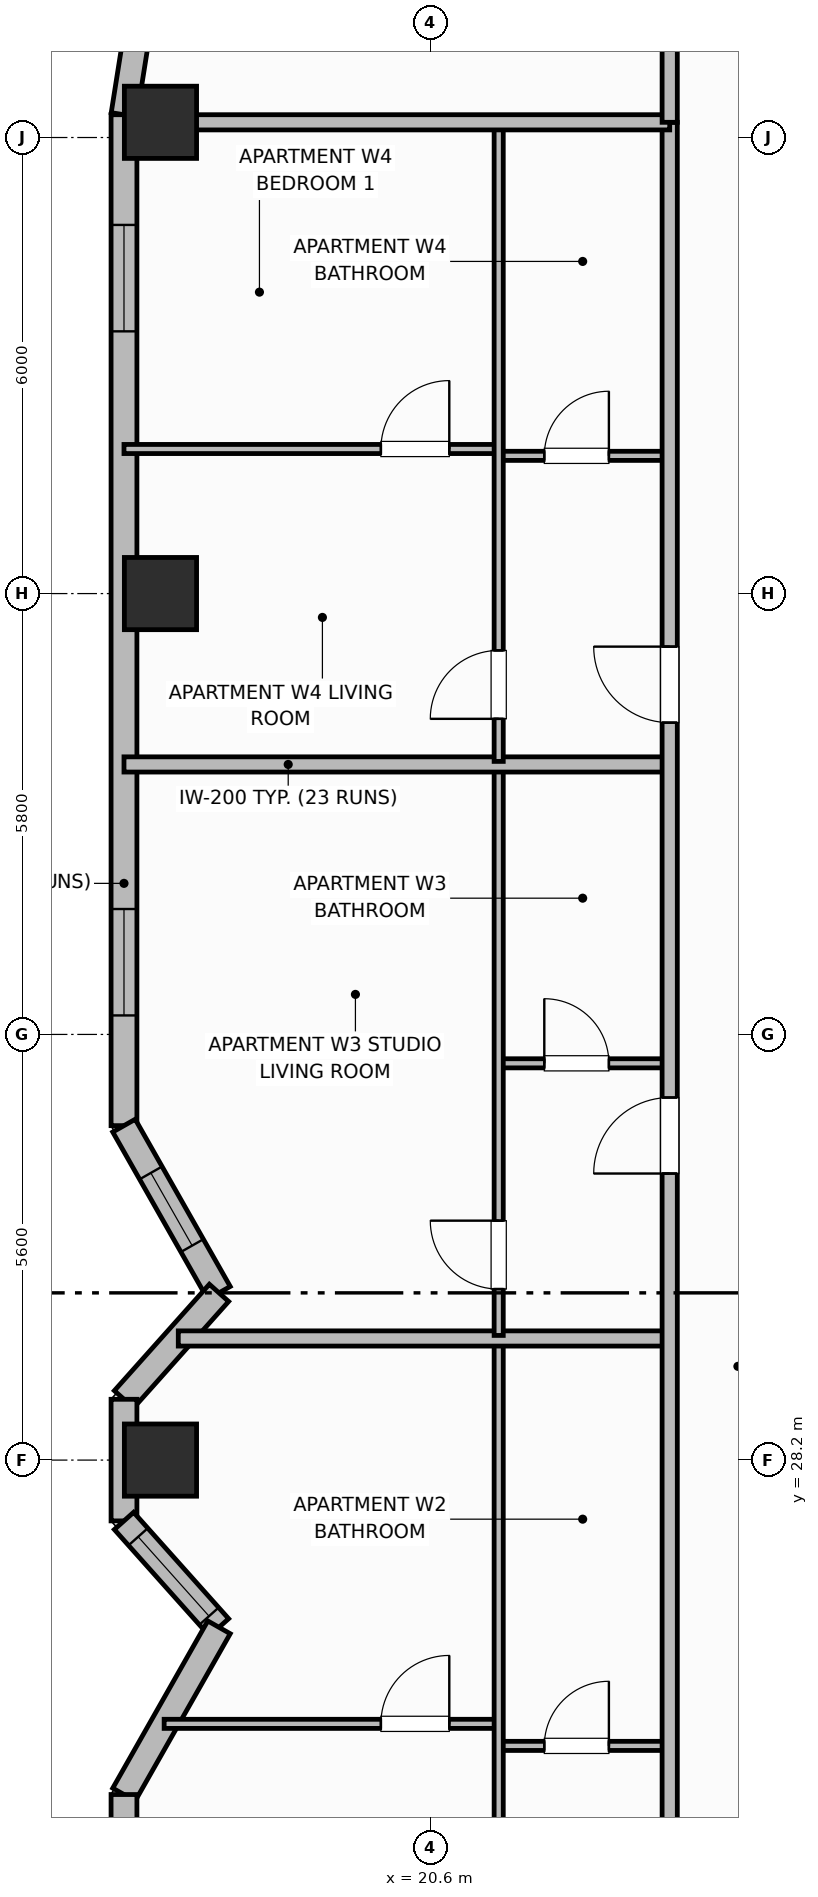
"""IFC4 building model, lengths in metres.
Left out: names, types, materials, properties, quantities, classifications, styles, units other than length and angle.
Written with IfcOpenShell. Run it as: python <this file> out.ifc"""

import sys

from ifc_helpers import new_model, si_unit, direction, frame, frame_2d, origin, origin_2d, place, context, subcontext, project, spatial, rectangle, extrude, element, fill, save


model = new_model("IFC4")
c1 = context("Model", 3, precision=1e-05, world=origin(), true_north=direction((0.0, 1.0)))
c2 = subcontext(c1, "Body", "Model", "MODEL_VIEW")
j1 = project(units=[si_unit("LENGTHUNIT", "METRE"), si_unit("PLANEANGLEUNIT", "RADIAN")], contexts=[c1])
p1 = place(None, origin())
s1 = spatial("IfcSite", under=j1, at=p1, CompositionType="ELEMENT")
p2 = place(p1, origin())
s2 = spatial("IfcBuilding", under=s1, at=p2, CompositionType="ELEMENT")
p3 = place(p2, frame((0.0, 0.0, 173.7)))
s3 = spatial("IfcBuildingStorey", under=s2, at=p3, CompositionType="ELEMENT", Elevation=173.7)
for number, where, z_axis, x_axis in (
    (1, (17.05, 28.2, 0.0), (0.0, 0.0, 1.0), (1.0, 0.0, 0.0)),
    (2, (17.05, 39.6, 0.0), (0.0, 0.0, 1.0), (1.0, 0.0, 0.0)),
    (3, (17.05, 45.8, 0.0), (0.0, 0.0, 1.0), (1.0, 0.0, 0.0)),
):
    element("IfcColumn", number, at=place(p3, frame(where, z_axis=z_axis, x_axis=x_axis)), inside=s3, PredefinedType="COLUMN", context=c2, shape_type="SweptSolid", body=[
        extrude(rectangle(XDim=0.95, YDim=0.95, at=origin_2d()), origin(), (0.0, 0.0, 1.0), 3.7),
    ])
p4 = place(p3, frame((16.748, 47.022, 0.0), z_axis=(0.0, 0.0, 1.0), x_axis=(-0.156481329164, -0.987680916907, 0.0)))
e4 = element("IfcWall", 4, at=p4, inside=s3, PredefinedType="SOLIDWALL", context=c2, shape_type="SweptSolid", body=[
    extrude(rectangle(XDim=1.136, YDim=0.34, at=frame_2d((0.568, 0.0))), origin(), (0.0, 0.0, 1.0), 2.72),
])
p5 = place(p3, frame((16.57, 45.9, 0.0), z_axis=(0.0, 0.0, 1.0), x_axis=(0.0, -1.0, 0.0)))
e5 = element("IfcWall", 5, at=p5, inside=s3, PredefinedType="SOLIDWALL", context=c2, shape_type="SweptSolid", body=[
    extrude(rectangle(XDim=13.3, YDim=0.34, at=frame_2d((6.65, 0.0))), origin(), (0.0, 0.0, 1.0), 2.72),
])
p6 = place(p5, frame((1.45, 0.0, 0.75)))
e6 = element("IfcOpeningElement", 6, at=p6, cuts=e5, PredefinedType="OPENING", context=c2, shape_type="SweptSolid", body=[
    extrude(rectangle(XDim=1.4, YDim=1.85, at=frame_2d((0.7, 0.925))), frame((0.0, 0.18, 0.0), z_axis=(0.0, -1.0, 0.0), x_axis=(1.0, 0.0, 0.0)), (0.0, 0.0, 1.0), 0.36),
])
p7 = place(p5, frame((10.45, 0.0, 0.75)))
e7 = element("IfcOpeningElement", 7, at=p7, cuts=e5, PredefinedType="OPENING", context=c2, shape_type="SweptSolid", body=[
    extrude(rectangle(XDim=1.4, YDim=1.85, at=frame_2d((0.7, 0.925))), frame((0.0, 0.18, 0.0), z_axis=(0.0, -1.0, 0.0), x_axis=(1.0, 0.0, 0.0)), (0.0, 0.0, 1.0), 0.36),
])
p8 = place(p3, frame((16.57, 32.6, 0.0), z_axis=(0.0, 0.0, 1.0), x_axis=(0.493976255291, -0.869475393101, 0.0)))
e8 = element("IfcWall", 8, at=p8, inside=s3, PredefinedType="SOLIDWALL", context=c2, shape_type="SweptSolid", body=[
    extrude(rectangle(XDim=2.531, YDim=0.34, at=frame_2d((1.265, 0.0))), origin(), (0.0, 0.0, 1.0), 2.72),
])
p9 = place(p8, frame((0.715, 0.0, 0.91)))
e9 = element("IfcOpeningElement", 9, at=p9, cuts=e8, PredefinedType="OPENING", context=c2, shape_type="SweptSolid", body=[
    extrude(rectangle(XDim=1.1, YDim=1.65, at=frame_2d((0.55, 0.825))), frame((0.0, 0.18, 0.0), z_axis=(0.0, -1.0, 0.0), x_axis=(1.0, 0.0, 0.0)), (0.0, 0.0, 1.0), 0.36),
])
p10 = place(p3, frame((17.82, 30.4, 0.0), z_axis=(0.0, 0.0, 1.0), x_axis=(-0.666041619974, -0.74591457987, 0.0)))
e10 = element("IfcWall", 10, at=p10, inside=s3, PredefinedType="SOLIDWALL", context=c2, shape_type="SweptSolid", body=[
    extrude(rectangle(XDim=1.877, YDim=0.34, at=frame_2d((0.938, 0.0))), origin(), (0.0, 0.0, 1.0), 2.72),
])
p11 = place(p3, frame((16.57, 29.0, 0.0), z_axis=(0.0, 0.0, 1.0), x_axis=(0.0, -1.0, 0.0)))
e11 = element("IfcWall", 11, at=p11, inside=s3, PredefinedType="SOLIDWALL", context=c2, shape_type="SweptSolid", body=[
    extrude(rectangle(XDim=1.6, YDim=0.34, at=frame_2d((0.8, 0.0))), origin(), (0.0, 0.0, 1.0), 2.72),
])
p12 = place(p3, frame((16.57, 27.4, 0.0), z_axis=(0.0, 0.0, 1.0), x_axis=(0.666041619974, -0.74591457987, 0.0)))
e12 = element("IfcWall", 12, at=p12, inside=s3, PredefinedType="SOLIDWALL", context=c2, shape_type="SweptSolid", body=[
    extrude(rectangle(XDim=1.877, YDim=0.34, at=frame_2d((0.938, 0.0))), origin(), (0.0, 0.0, 1.0), 2.72),
])
p13 = place(p12, frame((0.28, 0.0, 0.71)))
e13 = element("IfcOpeningElement", 13, at=p13, cuts=e12, PredefinedType="OPENING", context=c2, shape_type="SweptSolid", body=[
    extrude(rectangle(XDim=1.4, YDim=1.85, at=frame_2d((0.7, 0.925))), frame((0.0, 0.18, 0.0), z_axis=(0.0, -1.0, 0.0), x_axis=(1.0, 0.0, 0.0)), (0.0, 0.0, 1.0), 0.36),
])
p14 = place(p3, frame((17.82, 26.0, 0.0), z_axis=(0.0, 0.0, 1.0), x_axis=(-0.494017696272, -0.869451847873, 0.0)))
e14 = element("IfcWall", 14, at=p14, inside=s3, PredefinedType="SOLIDWALL", context=c2, shape_type="SweptSolid", body=[
    extrude(rectangle(XDim=2.53, YDim=0.34, at=frame_2d((1.265, 0.0))), origin(), (0.0, 0.0, 1.0), 2.72),
])
p15 = place(p3, frame((16.57, 23.8, 0.0), z_axis=(0.0, 0.0, 1.0), x_axis=(0.0, -1.0, 0.0)))
e15 = element("IfcWall", 15, at=p15, inside=s3, PredefinedType="SOLIDWALL", context=c2, shape_type="SweptSolid", body=[
    extrude(rectangle(XDim=13.3, YDim=0.34, at=frame_2d((6.65, 0.0))), origin(), (0.0, 0.0, 1.0), 2.72),
])
p16 = place(p15, frame((2.1, 0.0, 0.0)))
e16 = element("IfcOpeningElement", 16, at=p16, cuts=e15, PredefinedType="OPENING", context=c2, shape_type="SweptSolid", body=[
    extrude(rectangle(XDim=1.6, YDim=2.1, at=frame_2d((0.8, 1.05))), frame((0.0, 0.18, 0.0), z_axis=(0.0, -1.0, 0.0), x_axis=(1.0, 0.0, 0.0)), (0.0, 0.0, 1.0), 0.36),
])
p17 = place(p15, frame((5.04, 0.0, 0.71)))
e17 = element("IfcOpeningElement", 17, at=p17, cuts=e15, PredefinedType="OPENING", context=c2, shape_type="SweptSolid", body=[
    extrude(rectangle(XDim=1.4, YDim=1.85, at=frame_2d((0.7, 0.925))), frame((0.0, 0.18, 0.0), z_axis=(0.0, -1.0, 0.0), x_axis=(1.0, 0.0, 0.0)), (0.0, 0.0, 1.0), 0.36),
])
p18 = place(p15, frame((10.6, 0.0, 0.95)))
e18 = element("IfcOpeningElement", 18, at=p18, cuts=e15, PredefinedType="OPENING", context=c2, shape_type="SweptSolid", body=[
    extrude(rectangle(XDim=1.1, YDim=1.65, at=frame_2d((0.55, 0.825))), frame((0.0, 0.18, 0.0), z_axis=(0.0, -1.0, 0.0), x_axis=(1.0, 0.0, 0.0)), (0.0, 0.0, 1.0), 0.36),
])
p19 = place(p3, frame((21.5, 24.44, 0.0), z_axis=(0.0, 0.0, 1.0), x_axis=(1.0, 0.0, 0.0)))
e19 = element("IfcWall", 19, at=p19, inside=s3, PredefinedType="PARTITIONING", context=c2, shape_type="SweptSolid", body=[
    extrude(rectangle(XDim=2.25, YDim=0.12, at=frame_2d((1.125, 0.0))), origin(), (0.0, 0.0, 1.0), 2.55),
])
p20 = place(p19, frame((0.6, 0.0, 0.0)))
e20 = element("IfcOpeningElement", 20, at=p20, cuts=e19, PredefinedType="OPENING", context=c2, shape_type="SweptSolid", body=[
    extrude(rectangle(XDim=0.85, YDim=2.1, at=frame_2d((0.425, 1.05))), frame((0.0, 0.07, 0.0), z_axis=(0.0, -1.0, 0.0), x_axis=(1.0, 0.0, 0.0)), (0.0, 0.0, 1.0), 0.14),
])
p21 = place(p3, frame((17.098, 24.73, 0.0), z_axis=(0.0, 0.0, 1.0), x_axis=(1.0, 0.0, 0.0)))
e21 = element("IfcWall", 21, at=p21, inside=s3, PredefinedType="PARTITIONING", context=c2, shape_type="SweptSolid", body=[
    extrude(rectangle(XDim=4.402, YDim=0.12, at=frame_2d((2.201, 0.0))), origin(), (0.0, 0.0, 1.0), 2.55),
])
p22 = place(p21, frame((2.852, 0.0, 0.0)))
e22 = element("IfcOpeningElement", 22, at=p22, cuts=e21, PredefinedType="OPENING", context=c2, shape_type="SweptSolid", body=[
    extrude(rectangle(XDim=0.9, YDim=2.1, at=frame_2d((0.45, 1.05))), frame((0.0, 0.07, 0.0), z_axis=(0.0, -1.0, 0.0), x_axis=(1.0, 0.0, 0.0)), (0.0, 0.0, 1.0), 0.14),
])
p23 = place(p3, frame((21.5, 19.54, 0.0), z_axis=(0.0, 0.0, 1.0), x_axis=(0.0, 1.0, 0.0)))
e23 = element("IfcWall", 23, at=p23, inside=s3, PredefinedType="PARTITIONING", context=c2, shape_type="SweptSolid", body=[
    extrude(rectangle(XDim=10.22, YDim=0.12, at=frame_2d((5.11, 0.0))), origin(), (0.0, 0.0, 1.0), 2.55),
])
p24 = place(p23, frame((0.41, 0.0, 0.0)))
e24 = element("IfcOpeningElement", 24, at=p24, cuts=e23, PredefinedType="OPENING", context=c2, shape_type="SweptSolid", body=[
    extrude(rectangle(XDim=0.9, YDim=2.1, at=frame_2d((0.45, 1.05))), frame((0.0, 0.07, 0.0), z_axis=(0.0, -1.0, 0.0), x_axis=(1.0, 0.0, 0.0)), (0.0, 0.0, 1.0), 0.14),
])
p25 = place(p3, frame((17.284, 29.8, 0.0), z_axis=(0.0, 0.0, 1.0), x_axis=(1.0, 0.0, 0.0)))
e25 = element("IfcWall", 25, at=p25, inside=s3, PredefinedType="PARTITIONING", context=c2, shape_type="SweptSolid", body=[
    extrude(rectangle(XDim=6.466, YDim=0.2, at=frame_2d((3.233, 0.0))), origin(), (0.0, 0.0, 1.0), 2.55),
])
p26 = place(p3, frame((21.5, 33.42, 0.0), z_axis=(0.0, 0.0, 1.0), x_axis=(1.0, 0.0, 0.0)))
e26 = element("IfcWall", 26, at=p26, inside=s3, PredefinedType="PARTITIONING", context=c2, shape_type="SweptSolid", body=[
    extrude(rectangle(XDim=2.25, YDim=0.12, at=frame_2d((1.125, 0.0))), origin(), (0.0, 0.0, 1.0), 2.55),
])
p27 = place(p26, frame((0.6, 0.0, 0.0)))
e27 = element("IfcOpeningElement", 27, at=p27, cuts=e26, PredefinedType="OPENING", context=c2, shape_type="SweptSolid", body=[
    extrude(rectangle(XDim=0.85, YDim=2.1, at=frame_2d((0.425, 1.05))), frame((0.0, 0.07, 0.0), z_axis=(0.0, -1.0, 0.0), x_axis=(1.0, 0.0, 0.0)), (0.0, 0.0, 1.0), 0.14),
])
p28 = place(p3, frame((21.5, 29.84, 0.0), z_axis=(0.0, 0.0, 1.0), x_axis=(0.0, 1.0, 0.0)))
e28 = element("IfcWall", 28, at=p28, inside=s3, PredefinedType="PARTITIONING", context=c2, shape_type="SweptSolid", body=[
    extrude(rectangle(XDim=7.472, YDim=0.12, at=frame_2d((3.736, 0.0))), origin(), (0.0, 0.0, 1.0), 2.55),
])
p29 = place(p28, frame((0.61, 0.0, 0.0)))
e29 = element("IfcOpeningElement", 29, at=p29, cuts=e28, PredefinedType="OPENING", context=c2, shape_type="SweptSolid", body=[
    extrude(rectangle(XDim=0.9, YDim=2.1, at=frame_2d((0.45, 1.05))), frame((0.0, 0.07, 0.0), z_axis=(0.0, -1.0, 0.0), x_axis=(1.0, 0.0, 0.0)), (0.0, 0.0, 1.0), 0.14),
])
p30 = place(p3, frame((16.57, 37.352, 0.0), z_axis=(0.0, 0.0, 1.0), x_axis=(1.0, 0.0, 0.0)))
e30 = element("IfcWall", 30, at=p30, inside=s3, PredefinedType="PARTITIONING", context=c2, shape_type="SweptSolid", body=[
    extrude(rectangle(XDim=7.18, YDim=0.2, at=frame_2d((3.59, 0.0))), origin(), (0.0, 0.0, 1.0), 2.55),
])
p31 = place(p3, frame((21.5, 41.412, 0.0), z_axis=(0.0, 0.0, 1.0), x_axis=(1.0, 0.0, 0.0)))
e31 = element("IfcWall", 31, at=p31, inside=s3, PredefinedType="PARTITIONING", context=c2, shape_type="SweptSolid", body=[
    extrude(rectangle(XDim=2.25, YDim=0.12, at=frame_2d((1.125, 0.0))), origin(), (0.0, 0.0, 1.0), 2.55),
])
p32 = place(p31, frame((0.6, 0.0, 0.0)))
e32 = element("IfcOpeningElement", 32, at=p32, cuts=e31, PredefinedType="OPENING", context=c2, shape_type="SweptSolid", body=[
    extrude(rectangle(XDim=0.85, YDim=2.1, at=frame_2d((0.425, 1.05))), frame((0.0, 0.07, 0.0), z_axis=(0.0, -1.0, 0.0), x_axis=(1.0, 0.0, 0.0)), (0.0, 0.0, 1.0), 0.14),
])
p33 = place(p3, frame((16.57, 41.502, 0.0), z_axis=(0.0, 0.0, 1.0), x_axis=(1.0, 0.0, 0.0)))
e33 = element("IfcWall", 33, at=p33, inside=s3, PredefinedType="PARTITIONING", context=c2, shape_type="SweptSolid", body=[
    extrude(rectangle(XDim=4.93, YDim=0.12, at=frame_2d((2.465, 0.0))), origin(), (0.0, 0.0, 1.0), 2.55),
])
p34 = place(p33, frame((3.38, 0.0, 0.0)))
e34 = element("IfcOpeningElement", 34, at=p34, cuts=e33, PredefinedType="OPENING", context=c2, shape_type="SweptSolid", body=[
    extrude(rectangle(XDim=0.9, YDim=2.1, at=frame_2d((0.45, 1.05))), frame((0.0, 0.07, 0.0), z_axis=(0.0, -1.0, 0.0), x_axis=(1.0, 0.0, 0.0)), (0.0, 0.0, 1.0), 0.14),
])
p35 = place(p3, frame((21.5, 37.392, 0.0), z_axis=(0.0, 0.0, 1.0), x_axis=(0.0, 1.0, 0.0)))
e35 = element("IfcWall", 35, at=p35, inside=s3, PredefinedType="PARTITIONING", context=c2, shape_type="SweptSolid", body=[
    extrude(rectangle(XDim=8.368, YDim=0.12, at=frame_2d((4.184, 0.0))), origin(), (0.0, 0.0, 1.0), 2.55),
])
p36 = place(p35, frame((0.56, 0.0, 0.0)))
e36 = element("IfcOpeningElement", 36, at=p36, cuts=e35, PredefinedType="OPENING", context=c2, shape_type="SweptSolid", body=[
    extrude(rectangle(XDim=0.9, YDim=2.1, at=frame_2d((0.45, 1.05))), frame((0.0, 0.07, 0.0), z_axis=(0.0, -1.0, 0.0), x_axis=(1.0, 0.0, 0.0)), (0.0, 0.0, 1.0), 0.14),
])
p37 = place(p3, frame((23.75, 10.6, 0.0), z_axis=(0.0, 0.0, 1.0), x_axis=(0.0, 1.0, 0.0)))
e37 = element("IfcWall", 37, at=p37, inside=s3, PredefinedType="PARTITIONING", context=c2, shape_type="SweptSolid", body=[
    extrude(rectangle(XDim=35.2, YDim=0.2, at=frame_2d((17.6, 0.0))), origin(), (0.0, 0.0, 1.0), 2.55),
])
p38 = place(p37, frame((2.65, 0.0, 0.0)))
e38 = element("IfcOpeningElement", 38, at=p38, cuts=e37, PredefinedType="OPENING", context=c2, shape_type="SweptSolid", body=[
    extrude(rectangle(XDim=1.0, YDim=2.15, at=frame_2d((0.5, 1.075))), frame((0.0, 0.11, 0.0), z_axis=(0.0, -1.0, 0.0), x_axis=(1.0, 0.0, 0.0)), (0.0, 0.0, 1.0), 0.22),
])
p39 = place(p37, frame((11.4, 0.0, 0.0)))
e39 = element("IfcOpeningElement", 39, at=p39, cuts=e37, PredefinedType="OPENING", context=c2, shape_type="SweptSolid", body=[
    extrude(rectangle(XDim=1.0, YDim=2.15, at=frame_2d((0.5, 1.075))), frame((0.0, 0.11, 0.0), z_axis=(0.0, -1.0, 0.0), x_axis=(1.0, 0.0, 0.0)), (0.0, 0.0, 1.0), 0.22),
])
p40 = place(p37, frame((21.37, 0.0, 0.0)))
e40 = element("IfcOpeningElement", 40, at=p40, cuts=e37, PredefinedType="OPENING", context=c2, shape_type="SweptSolid", body=[
    extrude(rectangle(XDim=1.0, YDim=2.15, at=frame_2d((0.5, 1.075))), frame((0.0, 0.11, 0.0), z_axis=(0.0, -1.0, 0.0), x_axis=(1.0, 0.0, 0.0)), (0.0, 0.0, 1.0), 0.22),
])
p41 = place(p37, frame((27.302, 0.0, 0.0)))
e41 = element("IfcOpeningElement", 41, at=p41, cuts=e37, PredefinedType="OPENING", context=c2, shape_type="SweptSolid", body=[
    extrude(rectangle(XDim=1.0, YDim=2.15, at=frame_2d((0.5, 1.075))), frame((0.0, 0.11, 0.0), z_axis=(0.0, -1.0, 0.0), x_axis=(1.0, 0.0, 0.0)), (0.0, 0.0, 1.0), 0.22),
])
p42 = place(p3, frame((16.99, 45.8, 0.0), z_axis=(0.0, 0.0, 1.0), x_axis=(1.0, 0.0, 0.0)))
e42 = element("IfcWall", 42, at=p42, inside=s3, PredefinedType="PARTITIONING", context=c2, shape_type="SweptSolid", body=[
    extrude(rectangle(XDim=6.76, YDim=0.2, at=frame_2d((3.38, 0.0))), origin(), (0.0, 0.0, 1.0), 2.55),
])
p43 = place(p3, frame((23.75, 45.8, 0.0), z_axis=(0.0, 0.0, 1.0), x_axis=(0.0, 1.0, 0.0)))
e43 = element("IfcWall", 43, at=p43, inside=s3, PredefinedType="PARTITIONING", context=c2, shape_type="SweptSolid", body=[
    extrude(rectangle(XDim=3.73, YDim=0.2, at=frame_2d((1.865, 0.0))), origin(), (0.0, 0.0, 1.0), 2.55),
])
p44 = place(p6, origin())
e44 = element("IfcWindow", 44, at=p44, inside=s3, PartitioningType="SINGLE_PANEL", PredefinedType="WINDOW", context=c2, shape_type="SweptSolid", body=[
    extrude(rectangle(XDim=1.4, YDim=1.85, at=frame_2d((0.7, 0.925))), frame((0.0, 0.03, 0.0), z_axis=(0.0, -1.0, 0.0), x_axis=(1.0, 0.0, 0.0)), (0.0, 0.0, 1.0), 0.06),
])
fill(e6, e44)
p45 = place(p7, origin())
e45 = element("IfcWindow", 45, at=p45, inside=s3, PartitioningType="SINGLE_PANEL", PredefinedType="WINDOW", context=c2, shape_type="SweptSolid", body=[
    extrude(rectangle(XDim=1.4, YDim=1.85, at=frame_2d((0.7, 0.925))), frame((0.0, 0.03, 0.0), z_axis=(0.0, -1.0, 0.0), x_axis=(1.0, 0.0, 0.0)), (0.0, 0.0, 1.0), 0.06),
])
fill(e7, e45)
p46 = place(p9, origin())
e46 = element("IfcWindow", 46, at=p46, inside=s3, PartitioningType="SINGLE_PANEL", PredefinedType="WINDOW", context=c2, shape_type="SweptSolid", body=[
    extrude(rectangle(XDim=1.1, YDim=1.65, at=frame_2d((0.55, 0.825))), frame((0.0, 0.03, 0.0), z_axis=(0.0, -1.0, 0.0), x_axis=(1.0, 0.0, 0.0)), (0.0, 0.0, 1.0), 0.06),
])
fill(e9, e46)
p47 = place(p13, origin())
e47 = element("IfcWindow", 47, at=p47, inside=s3, PartitioningType="SINGLE_PANEL", PredefinedType="WINDOW", context=c2, shape_type="SweptSolid", body=[
    extrude(rectangle(XDim=1.4, YDim=1.85, at=frame_2d((0.7, 0.925))), frame((0.0, 0.03, 0.0), z_axis=(0.0, -1.0, 0.0), x_axis=(1.0, 0.0, 0.0)), (0.0, 0.0, 1.0), 0.06),
])
fill(e13, e47)
p48 = place(p20, origin())
e48 = element("IfcDoor", 48, at=p48, inside=s3, OperationType="SINGLE_SWING_RIGHT", PredefinedType="DOOR", context=c2, shape_type="SweptSolid", body=[
    extrude(rectangle(XDim=0.85, YDim=2.1, at=frame_2d((0.425, 1.05))), frame((0.0, 0.025, 0.0), z_axis=(0.0, -1.0, 0.0), x_axis=(1.0, 0.0, 0.0)), (0.0, 0.0, 1.0), 0.05),
])
fill(e20, e48)
p49 = place(p22, origin())
e49 = element("IfcDoor", 49, at=p49, inside=s3, OperationType="SINGLE_SWING_RIGHT", PredefinedType="DOOR", context=c2, shape_type="SweptSolid", body=[
    extrude(rectangle(XDim=0.9, YDim=2.1, at=frame_2d((0.45, 1.05))), frame((0.0, 0.025, 0.0), z_axis=(0.0, -1.0, 0.0), x_axis=(1.0, 0.0, 0.0)), (0.0, 0.0, 1.0), 0.05),
])
fill(e22, e49)
p50 = place(p27, origin())
e50 = element("IfcDoor", 50, at=p50, inside=s3, OperationType="SINGLE_SWING_LEFT", PredefinedType="DOOR", context=c2, shape_type="SweptSolid", body=[
    extrude(rectangle(XDim=0.85, YDim=2.1, at=frame_2d((0.425, 1.05))), frame((0.0, 0.025, 0.0), z_axis=(0.0, -1.0, 0.0), x_axis=(1.0, 0.0, 0.0)), (0.0, 0.0, 1.0), 0.05),
])
fill(e27, e50)
p51 = place(p29, origin())
e51 = element("IfcDoor", 51, at=p51, inside=s3, OperationType="SINGLE_SWING_RIGHT", PredefinedType="DOOR", context=c2, shape_type="SweptSolid", body=[
    extrude(rectangle(XDim=0.9, YDim=2.1, at=frame_2d((0.45, 1.05))), frame((0.0, 0.025, 0.0), z_axis=(0.0, -1.0, 0.0), x_axis=(1.0, 0.0, 0.0)), (0.0, 0.0, 1.0), 0.05),
])
fill(e29, e51)
p52 = place(p32, origin())
e52 = element("IfcDoor", 52, at=p52, inside=s3, OperationType="SINGLE_SWING_RIGHT", PredefinedType="DOOR", context=c2, shape_type="SweptSolid", body=[
    extrude(rectangle(XDim=0.85, YDim=2.1, at=frame_2d((0.425, 1.05))), frame((0.0, 0.025, 0.0), z_axis=(0.0, -1.0, 0.0), x_axis=(1.0, 0.0, 0.0)), (0.0, 0.0, 1.0), 0.05),
])
fill(e32, e52)
p53 = place(p34, origin())
e53 = element("IfcDoor", 53, at=p53, inside=s3, OperationType="SINGLE_SWING_RIGHT", PredefinedType="DOOR", context=c2, shape_type="SweptSolid", body=[
    extrude(rectangle(XDim=0.9, YDim=2.1, at=frame_2d((0.45, 1.05))), frame((0.0, 0.025, 0.0), z_axis=(0.0, -1.0, 0.0), x_axis=(1.0, 0.0, 0.0)), (0.0, 0.0, 1.0), 0.05),
])
fill(e34, e53)
p54 = place(p36, origin())
e54 = element("IfcDoor", 54, at=p54, inside=s3, OperationType="SINGLE_SWING_LEFT", PredefinedType="DOOR", context=c2, shape_type="SweptSolid", body=[
    extrude(rectangle(XDim=0.9, YDim=2.1, at=frame_2d((0.45, 1.05))), frame((0.0, 0.025, 0.0), z_axis=(0.0, -1.0, 0.0), x_axis=(1.0, 0.0, 0.0)), (0.0, 0.0, 1.0), 0.05),
])
fill(e36, e54)
p55 = place(p40, origin())
e55 = element("IfcDoor", 55, at=p55, inside=s3, OperationType="SINGLE_SWING_LEFT", PredefinedType="DOOR", context=c2, shape_type="SweptSolid", body=[
    extrude(rectangle(XDim=1.0, YDim=2.15, at=frame_2d((0.5, 1.075))), frame((0.0, 0.025, 0.0), z_axis=(0.0, -1.0, 0.0), x_axis=(1.0, 0.0, 0.0)), (0.0, 0.0, 1.0), 0.05),
])
fill(e40, e55)
p56 = place(p41, origin())
e56 = element("IfcDoor", 56, at=p56, inside=s3, OperationType="SINGLE_SWING_RIGHT", PredefinedType="DOOR", context=c2, shape_type="SweptSolid", body=[
    extrude(rectangle(XDim=1.0, YDim=2.15, at=frame_2d((0.5, 1.075))), frame((0.0, 0.025, 0.0), z_axis=(0.0, -1.0, 0.0), x_axis=(1.0, 0.0, 0.0)), (0.0, 0.0, 1.0), 0.05),
])
fill(e41, e56)
save(model, sys.argv[1])
